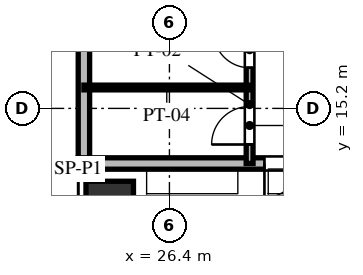
"""IFC4 building model, lengths in metres.
Left out: names, types, materials, properties, quantities, classifications, styles, units other than length and angle.
Written with IfcOpenShell. Run it as: python <this file> out.ifc"""

import sys

from ifc_helpers import new_model, si_unit, direction, frame, frame_2d, origin, origin_2d, place, context, subcontext, project, spatial, rectangle, extrude, element, fill, save


model = new_model("IFC4")
c1 = context("Model", 3, precision=1e-05, world=origin(), true_north=direction((0.0, 1.0)))
c2 = subcontext(c1, "Body", "Model", "MODEL_VIEW")
j1 = project(units=[si_unit("LENGTHUNIT", "METRE"), si_unit("PLANEANGLEUNIT", "RADIAN")], contexts=[c1])
p1 = place(None, origin())
s1 = spatial("IfcSite", under=j1, at=p1, CompositionType="ELEMENT")
p2 = place(p1, origin())
s2 = spatial("IfcBuilding", under=s1, at=p2, CompositionType="ELEMENT")
p3 = place(p2, origin())
s3 = spatial("IfcBuildingStorey", under=s2, at=p3, CompositionType="ELEMENT", Elevation=0.0)
p4 = place(p3, frame((24.829, 12.853, 0.0), z_axis=(0.0, 0.0, 1.0), x_axis=(1.0, 0.0, 0.0)))
e1 = element("IfcColumn", 1, at=p4, inside=s3, PredefinedType="COLUMN", context=c2, shape_type="SweptSolid", body=[
    extrude(rectangle(XDim=1.25, YDim=0.86, at=origin_2d()), origin(), (0.0, 0.0, 1.0), 6.0),
])
p5 = place(p3, frame((24.15, 13.75, 0.0), z_axis=(0.0, 0.0, 1.0), x_axis=(0.0, 1.0, 0.0)))
e2 = element("IfcWall", 2, at=p5, inside=s3, PredefinedType="SOLIDWALL", context=c2, shape_type="SweptSolid", body=[
    extrude(rectangle(XDim=22.48, YDim=0.3, at=frame_2d((11.24, 0.0))), origin(), (0.0, 0.0, 1.0), 5.72),
])
p6 = place(p5, frame((8.15, 0.0, 0.0)))
e3 = element("IfcOpeningElement", 3, at=p6, cuts=e2, PredefinedType="OPENING", context=c2, shape_type="SweptSolid", body=[
    extrude(rectangle(XDim=1.8, YDim=2.4, at=frame_2d((0.9, 1.2))), frame((0.0, 0.16, 0.0), z_axis=(0.0, -1.0, 0.0), x_axis=(1.0, 0.0, 0.0)), (0.0, 0.0, 1.0), 0.32),
])
p7 = place(p5, frame((13.4, 0.0, 0.0)))
e4 = element("IfcOpeningElement", 4, at=p7, cuts=e2, PredefinedType="OPENING", context=c2, shape_type="SweptSolid", body=[
    extrude(rectangle(XDim=1.8, YDim=2.4, at=frame_2d((0.9, 1.2))), frame((0.0, 0.16, 0.0), z_axis=(0.0, -1.0, 0.0), x_axis=(1.0, 0.0, 0.0)), (0.0, 0.0, 1.0), 0.32),
])
p8 = place(p5, frame((18.45, 0.0, 0.0)))
e5 = element("IfcOpeningElement", 5, at=p8, cuts=e2, PredefinedType="OPENING", context=c2, shape_type="SweptSolid", body=[
    extrude(rectangle(XDim=1.8, YDim=2.4, at=frame_2d((0.9, 1.2))), frame((0.0, 0.16, 0.0), z_axis=(0.0, -1.0, 0.0), x_axis=(1.0, 0.0, 0.0)), (0.0, 0.0, 1.0), 0.32),
])
p9 = place(p3, frame((47.2, 13.75, 0.0), z_axis=(0.0, 0.0, 1.0), x_axis=(-1.0, 0.0, 0.0)))
e6 = element("IfcWall", 6, at=p9, inside=s3, PredefinedType="SOLIDWALL", context=c2, shape_type="SweptSolid", body=[
    extrude(rectangle(XDim=23.2, YDim=0.3, at=frame_2d((11.6, 0.0))), origin(), (0.0, 0.0, 1.0), 5.72),
])
p10 = place(p9, frame((2.2, 0.0, 0.0)))
e7 = element("IfcOpeningElement", 7, at=p10, cuts=e6, PredefinedType="OPENING", context=c2, shape_type="SweptSolid", body=[
    extrude(rectangle(XDim=1.4, YDim=2.25, at=frame_2d((0.7, 1.125))), frame((0.0, 0.16, 0.0), z_axis=(0.0, -1.0, 0.0), x_axis=(1.0, 0.0, 0.0)), (0.0, 0.0, 1.0), 0.32),
])
p11 = place(p9, frame((6.5, 0.0, 0.0)))
e8 = element("IfcOpeningElement", 8, at=p11, cuts=e6, PredefinedType="OPENING", context=c2, shape_type="SweptSolid", body=[
    extrude(rectangle(XDim=1.8, YDim=2.4, at=frame_2d((0.9, 1.2))), frame((0.0, 0.16, 0.0), z_axis=(0.0, -1.0, 0.0), x_axis=(1.0, 0.0, 0.0)), (0.0, 0.0, 1.0), 0.32),
])
p12 = place(p9, frame((9.0, 0.0, 0.0)))
e9 = element("IfcOpeningElement", 9, at=p12, cuts=e6, PredefinedType="OPENING", context=c2, shape_type="SweptSolid", body=[
    extrude(rectangle(XDim=1.8, YDim=2.4, at=frame_2d((0.9, 1.2))), frame((0.0, 0.16, 0.0), z_axis=(0.0, -1.0, 0.0), x_axis=(1.0, 0.0, 0.0)), (0.0, 0.0, 1.0), 0.32),
])
p13 = place(p9, frame((11.5, 0.0, 0.0)))
e10 = element("IfcOpeningElement", 10, at=p13, cuts=e6, PredefinedType="OPENING", context=c2, shape_type="SweptSolid", body=[
    extrude(rectangle(XDim=1.8, YDim=2.4, at=frame_2d((0.9, 1.2))), frame((0.0, 0.16, 0.0), z_axis=(0.0, -1.0, 0.0), x_axis=(1.0, 0.0, 0.0)), (0.0, 0.0, 1.0), 0.32),
])
p14 = place(p9, frame((14.0, 0.0, 0.0)))
e11 = element("IfcOpeningElement", 11, at=p14, cuts=e6, PredefinedType="OPENING", context=c2, shape_type="SweptSolid", body=[
    extrude(rectangle(XDim=1.8, YDim=2.4, at=frame_2d((0.9, 1.2))), frame((0.0, 0.16, 0.0), z_axis=(0.0, -1.0, 0.0), x_axis=(1.0, 0.0, 0.0)), (0.0, 0.0, 1.0), 0.32),
])
p15 = place(p9, frame((16.5, 0.0, 0.0)))
e12 = element("IfcOpeningElement", 12, at=p15, cuts=e6, PredefinedType="OPENING", context=c2, shape_type="SweptSolid", body=[
    extrude(rectangle(XDim=1.8, YDim=2.4, at=frame_2d((0.9, 1.2))), frame((0.0, 0.16, 0.0), z_axis=(0.0, -1.0, 0.0), x_axis=(1.0, 0.0, 0.0)), (0.0, 0.0, 1.0), 0.32),
])
p16 = place(p3, frame((28.51, 13.75, 0.0), z_axis=(0.0, 0.0, 1.0), x_axis=(0.0, 1.0, 0.0)))
e13 = element("IfcWall", 13, at=p16, inside=s3, PredefinedType="PARTITIONING", context=c2, shape_type="SweptSolid", body=[
    extrude(rectangle(XDim=6.2, YDim=0.18, at=frame_2d((3.1, 0.0))), origin(), (0.0, 0.0, 1.0), 5.72),
])
p17 = place(p16, frame((0.5, 0.0, 0.0)))
e14 = element("IfcOpeningElement", 14, at=p17, cuts=e13, PredefinedType="OPENING", context=c2, shape_type="SweptSolid", body=[
    extrude(rectangle(XDim=1.0, YDim=2.1, at=frame_2d((0.5, 1.05))), frame((0.0, 0.1, 0.0), z_axis=(0.0, -1.0, 0.0), x_axis=(1.0, 0.0, 0.0)), (0.0, 0.0, 1.0), 0.2),
])
p18 = place(p16, frame((2.52, 0.0, 0.0)))
e15 = element("IfcOpeningElement", 15, at=p18, cuts=e13, PredefinedType="OPENING", context=c2, shape_type="SweptSolid", body=[
    extrude(rectangle(XDim=0.95, YDim=2.1, at=frame_2d((0.475, 1.05))), frame((0.0, 0.1, 0.0), z_axis=(0.0, -1.0, 0.0), x_axis=(1.0, 0.0, 0.0)), (0.0, 0.0, 1.0), 0.2),
])
p19 = place(p16, frame((4.45, 0.0, 0.0)))
e16 = element("IfcOpeningElement", 16, at=p19, cuts=e13, PredefinedType="OPENING", context=c2, shape_type="SweptSolid", body=[
    extrude(rectangle(XDim=1.05, YDim=2.15, at=frame_2d((0.525, 1.075))), frame((0.0, 0.1, 0.0), z_axis=(0.0, -1.0, 0.0), x_axis=(1.0, 0.0, 0.0)), (0.0, 0.0, 1.0), 0.2),
])
p20 = place(p3, frame((24.15, 15.75, 0.0), z_axis=(0.0, 0.0, 1.0), x_axis=(1.0, 0.0, 0.0)))
e17 = element("IfcWall", 17, at=p20, inside=s3, PredefinedType="PARTITIONING", context=c2, shape_type="SweptSolid", body=[
    extrude(rectangle(XDim=4.36, YDim=0.125, at=frame_2d((2.18, 0.0))), origin(), (0.0, 0.0, 1.0), 5.72),
])
p21 = place(p15, origin())
e18 = element("IfcDoor", 18, at=p21, inside=s3, OperationType="DOUBLE_DOOR_SINGLE_SWING", PredefinedType="DOOR", context=c2, shape_type="SweptSolid", body=[
    extrude(rectangle(XDim=1.8, YDim=2.4, at=frame_2d((0.9, 1.2))), frame((0.0, 0.025, 0.0), z_axis=(0.0, -1.0, 0.0), x_axis=(1.0, 0.0, 0.0)), (0.0, 0.0, 1.0), 0.05),
])
fill(e12, e18)
p22 = place(p17, origin())
e19 = element("IfcDoor", 19, at=p22, inside=s3, OperationType="SINGLE_SWING_LEFT", PredefinedType="DOOR", context=c2, shape_type="SweptSolid", body=[
    extrude(rectangle(XDim=1.0, YDim=2.1, at=frame_2d((0.5, 1.05))), frame((0.0, 0.025, 0.0), z_axis=(0.0, -1.0, 0.0), x_axis=(1.0, 0.0, 0.0)), (0.0, 0.0, 1.0), 0.05),
])
fill(e14, e19)
p23 = place(p18, origin())
e20 = element("IfcDoor", 20, at=p23, inside=s3, OperationType="SINGLE_SWING_RIGHT", PredefinedType="DOOR", context=c2, shape_type="SweptSolid", body=[
    extrude(rectangle(XDim=0.95, YDim=2.1, at=frame_2d((0.475, 1.05))), frame((0.0, 0.025, 0.0), z_axis=(0.0, -1.0, 0.0), x_axis=(1.0, 0.0, 0.0)), (0.0, 0.0, 1.0), 0.05),
])
fill(e15, e20)
save(model, sys.argv[1])
